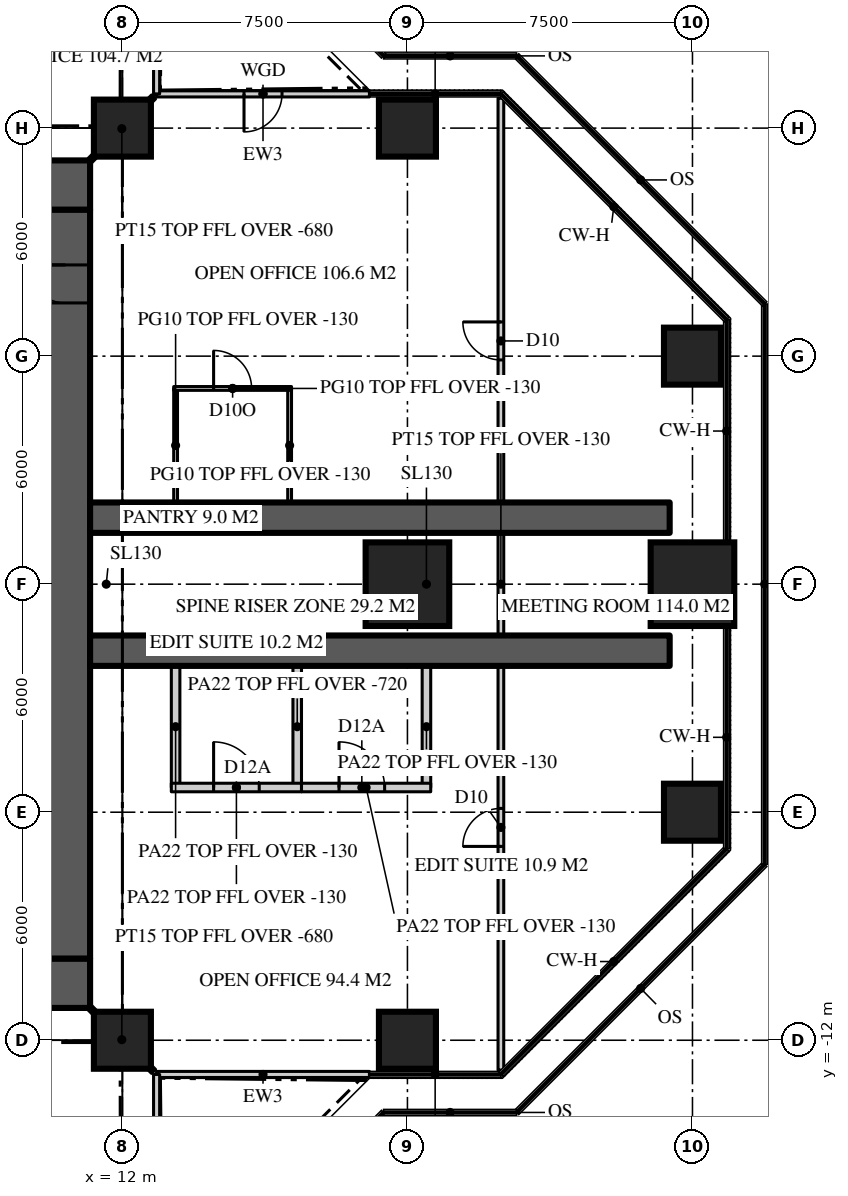
"""IFC4 building model, lengths in metres.
Left out: names, types, materials, properties, quantities, classifications, styles, units other than length and angle.
Written with IfcOpenShell. Run it as: python <this file> out.ifc"""

import sys

from ifc_helpers import new_model, si_unit, direction, frame, frame_2d, origin, origin_2d, place, context, subcontext, project, spatial, rectangle, extrude, element, fill, save


model = new_model("IFC4")
c1 = context("Model", 3, precision=1e-05, world=origin(), true_north=direction((0.0, 1.0)))
c2 = subcontext(c1, "Body", "Model", "MODEL_VIEW")
j1 = project(units=[si_unit("LENGTHUNIT", "METRE"), si_unit("PLANEANGLEUNIT", "RADIAN")], contexts=[c1])
p1 = place(None, origin())
s1 = spatial("IfcSite", under=j1, at=p1, CompositionType="ELEMENT")
p2 = place(p1, origin())
s2 = spatial("IfcBuilding", under=s1, at=p2, CompositionType="ELEMENT")
p3 = place(p2, frame((0.0, 0.0, 236.1)))
s3 = spatial("IfcBuildingStorey", under=s2, at=p3, CompositionType="ELEMENT", Elevation=236.1)
p4 = place(p3, frame((-11.15, 10.5, 0.0), z_axis=(0.0, 0.0, 1.0), x_axis=(1.0, 0.0, 0.0)))
e1 = element("IfcWall", 1, at=p4, inside=s3, PredefinedType="SHEAR", context=c2, shape_type="SweptSolid", body=[
    extrude(rectangle(XDim=22.3, YDim=1.3, at=frame_2d((11.15, 0.0))), origin(), (0.0, 0.0, 1.0), 3.9),
])
p5 = place(p4, frame((4.25, 0.0, 0.0)))
e2 = element("IfcOpeningElement", 2, at=p5, cuts=e1, PredefinedType="OPENING", context=c2, shape_type="SweptSolid", body=[
    extrude(rectangle(XDim=1.8, YDim=2.2, at=frame_2d((0.9, 1.1))), frame((0.0, 0.66, 0.0), z_axis=(0.0, -1.0, 0.0), x_axis=(1.0, 0.0, 0.0)), (0.0, 0.0, 1.0), 1.32),
])
p6 = place(p4, frame((16.25, 0.0, 0.0)))
e3 = element("IfcOpeningElement", 3, at=p6, cuts=e1, PredefinedType="OPENING", context=c2, shape_type="SweptSolid", body=[
    extrude(rectangle(XDim=1.8, YDim=2.2, at=frame_2d((0.9, 1.1))), frame((0.0, 0.66, 0.0), z_axis=(0.0, -1.0, 0.0), x_axis=(1.0, 0.0, 0.0)), (0.0, 0.0, 1.0), 1.32),
])
p7 = place(p3, frame((11.15, -10.5, 0.0), z_axis=(0.0, 0.0, 1.0), x_axis=(-1.0, 0.0, 0.0)))
e4 = element("IfcWall", 4, at=p7, inside=s3, PredefinedType="SHEAR", context=c2, shape_type="SweptSolid", body=[
    extrude(rectangle(XDim=22.3, YDim=1.3, at=frame_2d((11.15, 0.0))), origin(), (0.0, 0.0, 1.0), 3.9),
])
p8 = place(p7, frame((16.25, 0.0, 0.0)))
e5 = element("IfcOpeningElement", 5, at=p8, cuts=e4, PredefinedType="OPENING", context=c2, shape_type="SweptSolid", body=[
    extrude(rectangle(XDim=1.8, YDim=2.2, at=frame_2d((0.9, 1.1))), frame((0.0, 0.66, 0.0), z_axis=(0.0, -1.0, 0.0), x_axis=(1.0, 0.0, 0.0)), (0.0, 0.0, 1.0), 1.32),
])
p9 = place(p7, frame((4.25, 0.0, 0.0)))
e6 = element("IfcOpeningElement", 6, at=p9, cuts=e4, PredefinedType="OPENING", context=c2, shape_type="SweptSolid", body=[
    extrude(rectangle(XDim=1.8, YDim=2.2, at=frame_2d((0.9, 1.1))), frame((0.0, 0.66, 0.0), z_axis=(0.0, -1.0, 0.0), x_axis=(1.0, 0.0, 0.0)), (0.0, 0.0, 1.0), 1.32),
])
p10 = place(p3, frame((10.5, -9.85, 0.0), z_axis=(0.0, 0.0, 1.0), x_axis=(0.0, 1.0, 0.0)))
e7 = element("IfcWall", 7, at=p10, inside=s3, PredefinedType="SHEAR", context=c2, shape_type="SweptSolid", body=[
    extrude(rectangle(XDim=19.7, YDim=1.3, at=frame_2d((9.85, 0.0))), origin(), (0.0, 0.0, 1.0), 3.9),
])
p11 = place(p10, frame((17.25, 0.0, 0.0)))
e8 = element("IfcOpeningElement", 8, at=p11, cuts=e7, PredefinedType="OPENING", context=c2, shape_type="SweptSolid", body=[
    extrude(rectangle(XDim=1.0, YDim=2.2, at=frame_2d((0.5, 1.1))), frame((0.0, 0.66, 0.0), z_axis=(0.0, -1.0, 0.0), x_axis=(1.0, 0.0, 0.0)), (0.0, 0.0, 1.0), 1.32),
])
for number, where, z_axis, x_axis in (
    (9, (11.15, -1.75, 0.0), (0.0, 0.0, 1.0), (1.0, 0.0, 0.0)),
    (10, (11.15, 1.75, 0.0), (0.0, 0.0, 1.0), (1.0, 0.0, 0.0)),
):
    element("IfcWall", number, at=place(p3, frame(where, z_axis=z_axis, x_axis=x_axis)), inside=s3, PredefinedType="SHEAR", context=c2, shape_type="SweptSolid", body=[
        extrude(rectangle(XDim=15.25, YDim=0.8, at=frame_2d((7.625, 0.0))), origin(), (0.0, 0.0, 1.0), 3.9),
    ])
for number, where, z_axis, x_axis in (
    (11, (12.0, -12.0, 0.0), (0.0, 0.0, 1.0), (1.0, 0.0, 0.0)),
    (12, (19.5, -12.0, 0.0), (0.0, 0.0, 1.0), (1.0, 0.0, 0.0)),
    (13, (27.0, -6.0, 0.0), (0.0, 0.0, 1.0), (1.0, 0.0, 0.0)),
):
    element("IfcColumn", number, at=place(p3, frame(where, z_axis=z_axis, x_axis=x_axis)), inside=s3, PredefinedType="COLUMN", context=c2, shape_type="SweptSolid", body=[
        extrude(rectangle(XDim=1.5, YDim=1.5, at=origin_2d()), origin(), (0.0, 0.0, 1.0), 3.9),
    ])
for number, where, z_axis, x_axis in (
    (14, (19.5, 0.0, 0.0), (0.0, 0.0, 1.0), (1.0, 0.0, 0.0)),
    (15, (27.0, 0.0, 0.0), (0.0, 0.0, 1.0), (1.0, 0.0, 0.0)),
):
    element("IfcColumn", number, at=place(p3, frame(where, z_axis=z_axis, x_axis=x_axis)), inside=s3, PredefinedType="COLUMN", context=c2, shape_type="SweptSolid", body=[
        extrude(rectangle(XDim=2.2, YDim=2.2, at=origin_2d()), origin(), (0.0, 0.0, 1.0), 3.9),
    ])
for number, where, z_axis, x_axis in (
    (16, (27.0, 6.0, 0.0), (0.0, 0.0, 1.0), (1.0, 0.0, 0.0)),
    (17, (12.0, 12.0, 0.0), (0.0, 0.0, 1.0), (1.0, 0.0, 0.0)),
    (18, (19.5, 12.0, 0.0), (0.0, 0.0, 1.0), (1.0, 0.0, 0.0)),
):
    element("IfcColumn", number, at=place(p3, frame(where, z_axis=z_axis, x_axis=x_axis)), inside=s3, PredefinedType="COLUMN", context=c2, shape_type="SweptSolid", body=[
        extrude(rectangle(XDim=1.5, YDim=1.5, at=origin_2d()), origin(), (0.0, 0.0, 1.0), 3.9),
    ])
p12 = place(p3, frame((12.9, -12.9, 0.0), z_axis=(0.0, 0.0, 1.0), x_axis=(1.0, 0.0, 0.0)))
e19 = element("IfcWall", 19, at=p12, inside=s3, PredefinedType="SOLIDWALL", context=c2, shape_type="SweptSolid", body=[
    extrude(rectangle(XDim=5.6, YDim=0.16, at=frame_2d((2.8, 0.0))), origin(), (0.0, 0.0, 1.0), 3.77),
])
p13 = place(p3, frame((18.5, 12.9, 0.0), z_axis=(0.0, 0.0, 1.0), x_axis=(-1.0, 0.0, 0.0)))
e20 = element("IfcWall", 20, at=p13, inside=s3, PredefinedType="SOLIDWALL", context=c2, shape_type="SweptSolid", body=[
    extrude(rectangle(XDim=5.6, YDim=0.16, at=frame_2d((2.8, 0.0))), origin(), (0.0, 0.0, 1.0), 3.77),
])
p14 = place(p13, frame((2.3, 0.0, 0.0)))
e21 = element("IfcOpeningElement", 21, at=p14, cuts=e20, PredefinedType="OPENING", context=c2, shape_type="SweptSolid", body=[
    extrude(rectangle(XDim=1.0, YDim=2.2, at=frame_2d((0.5, 1.1))), frame((0.0, 0.09, 0.0), z_axis=(0.0, -1.0, 0.0), x_axis=(1.0, 0.0, 0.0)), (0.0, 0.0, 1.0), 0.18),
])
p15 = place(p3, frame((12.9, 12.9, 0.0), z_axis=(0.0, 0.0, 1.0), x_axis=(0.0, 1.0, 0.0)))
e22 = element("IfcWall", 22, at=p15, inside=s3, PredefinedType="SOLIDWALL", context=c2, shape_type="SweptSolid", body=[
    extrude(rectangle(XDim=5.6, YDim=0.16, at=frame_2d((2.8, 0.0))), origin(), (0.0, 0.0, 1.0), 3.77),
])
p16 = place(p3, frame((12.9, -18.5, 0.0), z_axis=(0.0, 0.0, 1.0), x_axis=(0.0, 1.0, 0.0)))
e23 = element("IfcWall", 23, at=p16, inside=s3, PredefinedType="SOLIDWALL", context=c2, shape_type="SweptSolid", body=[
    extrude(rectangle(XDim=5.6, YDim=0.16, at=frame_2d((2.8, 0.0))), origin(), (0.0, 0.0, 1.0), 3.77),
])
p17 = place(p16, frame((2.3, 0.0, 0.0)))
e24 = element("IfcOpeningElement", 24, at=p17, cuts=e23, PredefinedType="OPENING", context=c2, shape_type="SweptSolid", body=[
    extrude(rectangle(XDim=1.0, YDim=2.2, at=frame_2d((0.5, 1.1))), frame((0.0, 0.09, 0.0), z_axis=(0.0, -1.0, 0.0), x_axis=(1.0, 0.0, 0.0)), (0.0, 0.0, 1.0), 0.18),
])
p18 = place(p3, frame((21.959, -12.786, 0.0), z_axis=(0.0, 0.0, 1.0), x_axis=(0.0, 1.0, 0.0)))
e25 = element("IfcWall", 25, at=p18, inside=s3, PredefinedType="PARTITIONING", context=c2, shape_type="SweptSolid", body=[
    extrude(rectangle(XDim=25.573, YDim=0.15, at=frame_2d((12.786, 0.0))), origin(), (0.0, 0.0, 1.0), 3.77),
])
p19 = place(p18, frame((18.687, 0.0, 0.0)))
e26 = element("IfcOpeningElement", 26, at=p19, cuts=e25, PredefinedType="OPENING", context=c2, shape_type="SweptSolid", body=[
    extrude(rectangle(XDim=1.0, YDim=2.2, at=frame_2d((0.5, 1.1))), frame((0.0, 0.085, 0.0), z_axis=(0.0, -1.0, 0.0), x_axis=(1.0, 0.0, 0.0)), (0.0, 0.0, 1.0), 0.17),
])
p20 = place(p18, frame((5.886, 0.0, 0.0)))
e27 = element("IfcOpeningElement", 27, at=p20, cuts=e25, PredefinedType="OPENING", context=c2, shape_type="SweptSolid", body=[
    extrude(rectangle(XDim=1.0, YDim=2.2, at=frame_2d((0.5, 1.1))), frame((0.0, 0.085, 0.0), z_axis=(0.0, -1.0, 0.0), x_axis=(1.0, 0.0, 0.0)), (0.0, 0.0, 1.0), 0.17),
])
for number, where, z_axis, x_axis in (
    (28, (13.4, 2.15, 0.0), (0.0, 0.0, 1.0), (0.0, 1.0, 0.0)),
    (29, (16.4, 2.15, 0.0), (0.0, 0.0, 1.0), (0.0, 1.0, 0.0)),
):
    element("IfcWall", number, at=place(p3, frame(where, z_axis=z_axis, x_axis=x_axis)), inside=s3, PredefinedType="PARTITIONING", context=c2, shape_type="SweptSolid", body=[
        extrude(rectangle(XDim=3.0, YDim=0.1, at=frame_2d((1.5, 0.0))), origin(), (0.0, 0.0, 1.0), 3.77),
    ])
p21 = place(p3, frame((13.35, 5.15, 0.0), z_axis=(0.0, 0.0, 1.0), x_axis=(1.0, 0.0, 0.0)))
e30 = element("IfcWall", 30, at=p21, inside=s3, PredefinedType="PARTITIONING", context=c2, shape_type="SweptSolid", body=[
    extrude(rectangle(XDim=3.1, YDim=0.1, at=frame_2d((1.55, 0.0))), origin(), (0.0, 0.0, 1.0), 3.77),
])
p22 = place(p21, frame((1.05, 0.0, 0.0)))
e31 = element("IfcOpeningElement", 31, at=p22, cuts=e30, PredefinedType="OPENING", context=c2, shape_type="SweptSolid", body=[
    extrude(rectangle(XDim=1.0, YDim=2.2, at=frame_2d((0.5, 1.1))), frame((0.0, 0.06, 0.0), z_axis=(0.0, -1.0, 0.0), x_axis=(1.0, 0.0, 0.0)), (0.0, 0.0, 1.0), 0.12),
])
p23 = place(p3, frame((13.4, -2.15, 0.0), z_axis=(0.0, 0.0, 1.0), x_axis=(0.0, -1.0, 0.0)))
e32 = element("IfcWall", 32, at=p23, inside=s3, PredefinedType="PARTITIONING", context=c2, shape_type="SweptSolid", body=[
    extrude(rectangle(XDim=3.2, YDim=0.225, at=frame_2d((1.6, 0.0))), origin(), (0.0, 0.0, 1.0), 3.77),
])
p24 = place(p3, frame((16.6, -2.15, 0.0), z_axis=(0.0, 0.0, 1.0), x_axis=(0.0, -1.0, 0.0)))
e33 = element("IfcWall", 33, at=p24, inside=s3, PredefinedType="PARTITIONING", context=c2, shape_type="SweptSolid", body=[
    extrude(rectangle(XDim=3.2, YDim=0.225, at=frame_2d((1.6, 0.0))), origin(), (0.0, 0.0, 1.0), 3.18),
])
p25 = place(p3, frame((13.288, -5.35, 0.0), z_axis=(0.0, 0.0, 1.0), x_axis=(1.0, 0.0, 0.0)))
e34 = element("IfcWall", 34, at=p25, inside=s3, PredefinedType="PARTITIONING", context=c2, shape_type="SweptSolid", body=[
    extrude(rectangle(XDim=3.425, YDim=0.225, at=frame_2d((1.712, 0.0))), origin(), (0.0, 0.0, 1.0), 3.77),
])
p26 = place(p25, frame((1.113, 0.0, 0.0)))
e35 = element("IfcOpeningElement", 35, at=p26, cuts=e34, PredefinedType="OPENING", context=c2, shape_type="SweptSolid", body=[
    extrude(rectangle(XDim=1.2, YDim=2.2, at=frame_2d((0.6, 1.1))), frame((0.0, 0.123, 0.0), z_axis=(0.0, -1.0, 0.0), x_axis=(1.0, 0.0, 0.0)), (0.0, 0.0, 1.0), 0.245),
])
p27 = place(p3, frame((20.0, -2.15, 0.0), z_axis=(0.0, 0.0, 1.0), x_axis=(0.0, -1.0, 0.0)))
e36 = element("IfcWall", 36, at=p27, inside=s3, PredefinedType="PARTITIONING", context=c2, shape_type="SweptSolid", body=[
    extrude(rectangle(XDim=3.2, YDim=0.225, at=frame_2d((1.6, 0.0))), origin(), (0.0, 0.0, 1.0), 3.77),
])
p28 = place(p3, frame((16.712, -5.35, 0.0), z_axis=(0.0, 0.0, 1.0), x_axis=(1.0, 0.0, 0.0)))
e37 = element("IfcWall", 37, at=p28, inside=s3, PredefinedType="PARTITIONING", context=c2, shape_type="SweptSolid", body=[
    extrude(rectangle(XDim=3.4, YDim=0.225, at=frame_2d((1.7, 0.0))), origin(), (0.0, 0.0, 1.0), 3.77),
])
p29 = place(p28, frame((0.988, 0.0, 0.0)))
e38 = element("IfcOpeningElement", 38, at=p29, cuts=e37, PredefinedType="OPENING", context=c2, shape_type="SweptSolid", body=[
    extrude(rectangle(XDim=1.2, YDim=2.2, at=frame_2d((0.6, 1.1))), frame((0.0, 0.123, 0.0), z_axis=(0.0, -1.0, 0.0), x_axis=(1.0, 0.0, 0.0)), (0.0, 0.0, 1.0), 0.245),
])
for number, where, z_axis, x_axis in (
    (39, (11.15, 11.15, 0.0), (0.0, 0.0, 1.0), (0.707, 0.707, 0.0)),
    (40, (11.15, -11.15, 0.0), (0.0, 0.0, 1.0), (0.707, -0.707, 0.0)),
):
    element("IfcWall", number, at=place(p3, frame(where, z_axis=z_axis, x_axis=x_axis)), inside=s3, PredefinedType="PARTITIONING", context=c2, shape_type="SweptSolid", body=[
        extrude(rectangle(XDim=2.362, YDim=0.15, at=frame_2d((1.181, 0.0))), origin(), (0.0, 0.0, 1.0), 3.22),
    ])
p30 = place(p14, origin())
e41 = element("IfcDoor", 41, at=p30, inside=s3, OperationType="SINGLE_SWING_RIGHT", PredefinedType="DOOR", context=c2, shape_type="SweptSolid", body=[
    extrude(rectangle(XDim=1.0, YDim=2.2, at=frame_2d((0.5, 1.1))), frame((0.0, 0.025, 0.0), z_axis=(0.0, -1.0, 0.0), x_axis=(1.0, 0.0, 0.0)), (0.0, 0.0, 1.0), 0.05),
])
fill(e21, e41)
p31 = place(p11, origin())
e42 = element("IfcDoor", 42, at=p31, inside=s3, OperationType="SINGLE_SWING_RIGHT", PredefinedType="DOOR", context=c2, shape_type="SweptSolid", body=[
    extrude(rectangle(XDim=1.0, YDim=2.2, at=frame_2d((0.5, 1.1))), frame((0.0, 0.025, 0.0), z_axis=(0.0, -1.0, 0.0), x_axis=(1.0, 0.0, 0.0)), (0.0, 0.0, 1.0), 0.05),
])
fill(e8, e42)
p32 = place(p19, origin())
e43 = element("IfcDoor", 43, at=p32, inside=s3, OperationType="SINGLE_SWING_RIGHT", PredefinedType="DOOR", context=c2, shape_type="SweptSolid", body=[
    extrude(rectangle(XDim=1.0, YDim=2.2, at=frame_2d((0.5, 1.1))), frame((0.0, 0.025, 0.0), z_axis=(0.0, -1.0, 0.0), x_axis=(1.0, 0.0, 0.0)), (0.0, 0.0, 1.0), 0.05),
])
fill(e26, e43)
p33 = place(p20, origin())
e44 = element("IfcDoor", 44, at=p33, inside=s3, OperationType="SINGLE_SWING_LEFT", PredefinedType="DOOR", context=c2, shape_type="SweptSolid", body=[
    extrude(rectangle(XDim=1.0, YDim=2.2, at=frame_2d((0.5, 1.1))), frame((0.0, 0.025, 0.0), z_axis=(0.0, -1.0, 0.0), x_axis=(1.0, 0.0, 0.0)), (0.0, 0.0, 1.0), 0.05),
])
fill(e27, e44)
p34 = place(p22, origin())
e45 = element("IfcDoor", 45, at=p34, inside=s3, OperationType="SINGLE_SWING_LEFT", PredefinedType="DOOR", context=c2, shape_type="SweptSolid", body=[
    extrude(rectangle(XDim=1.0, YDim=2.2, at=frame_2d((0.5, 1.1))), frame((0.0, 0.025, 0.0), z_axis=(0.0, -1.0, 0.0), x_axis=(1.0, 0.0, 0.0)), (0.0, 0.0, 1.0), 0.05),
])
fill(e31, e45)
p35 = place(p26, origin())
e46 = element("IfcDoor", 46, at=p35, inside=s3, OperationType="SINGLE_SWING_LEFT", PredefinedType="DOOR", context=c2, shape_type="SweptSolid", body=[
    extrude(rectangle(XDim=1.2, YDim=2.2, at=frame_2d((0.6, 1.1))), frame((0.0, 0.025, 0.0), z_axis=(0.0, -1.0, 0.0), x_axis=(1.0, 0.0, 0.0)), (0.0, 0.0, 1.0), 0.05),
])
fill(e35, e46)
p36 = place(p29, origin())
e47 = element("IfcDoor", 47, at=p36, inside=s3, OperationType="SINGLE_SWING_LEFT", PredefinedType="DOOR", context=c2, shape_type="SweptSolid", body=[
    extrude(rectangle(XDim=1.2, YDim=2.2, at=frame_2d((0.6, 1.1))), frame((0.0, 0.025, 0.0), z_axis=(0.0, -1.0, 0.0), x_axis=(1.0, 0.0, 0.0)), (0.0, 0.0, 1.0), 0.05),
])
fill(e38, e47)
save(model, sys.argv[1])
